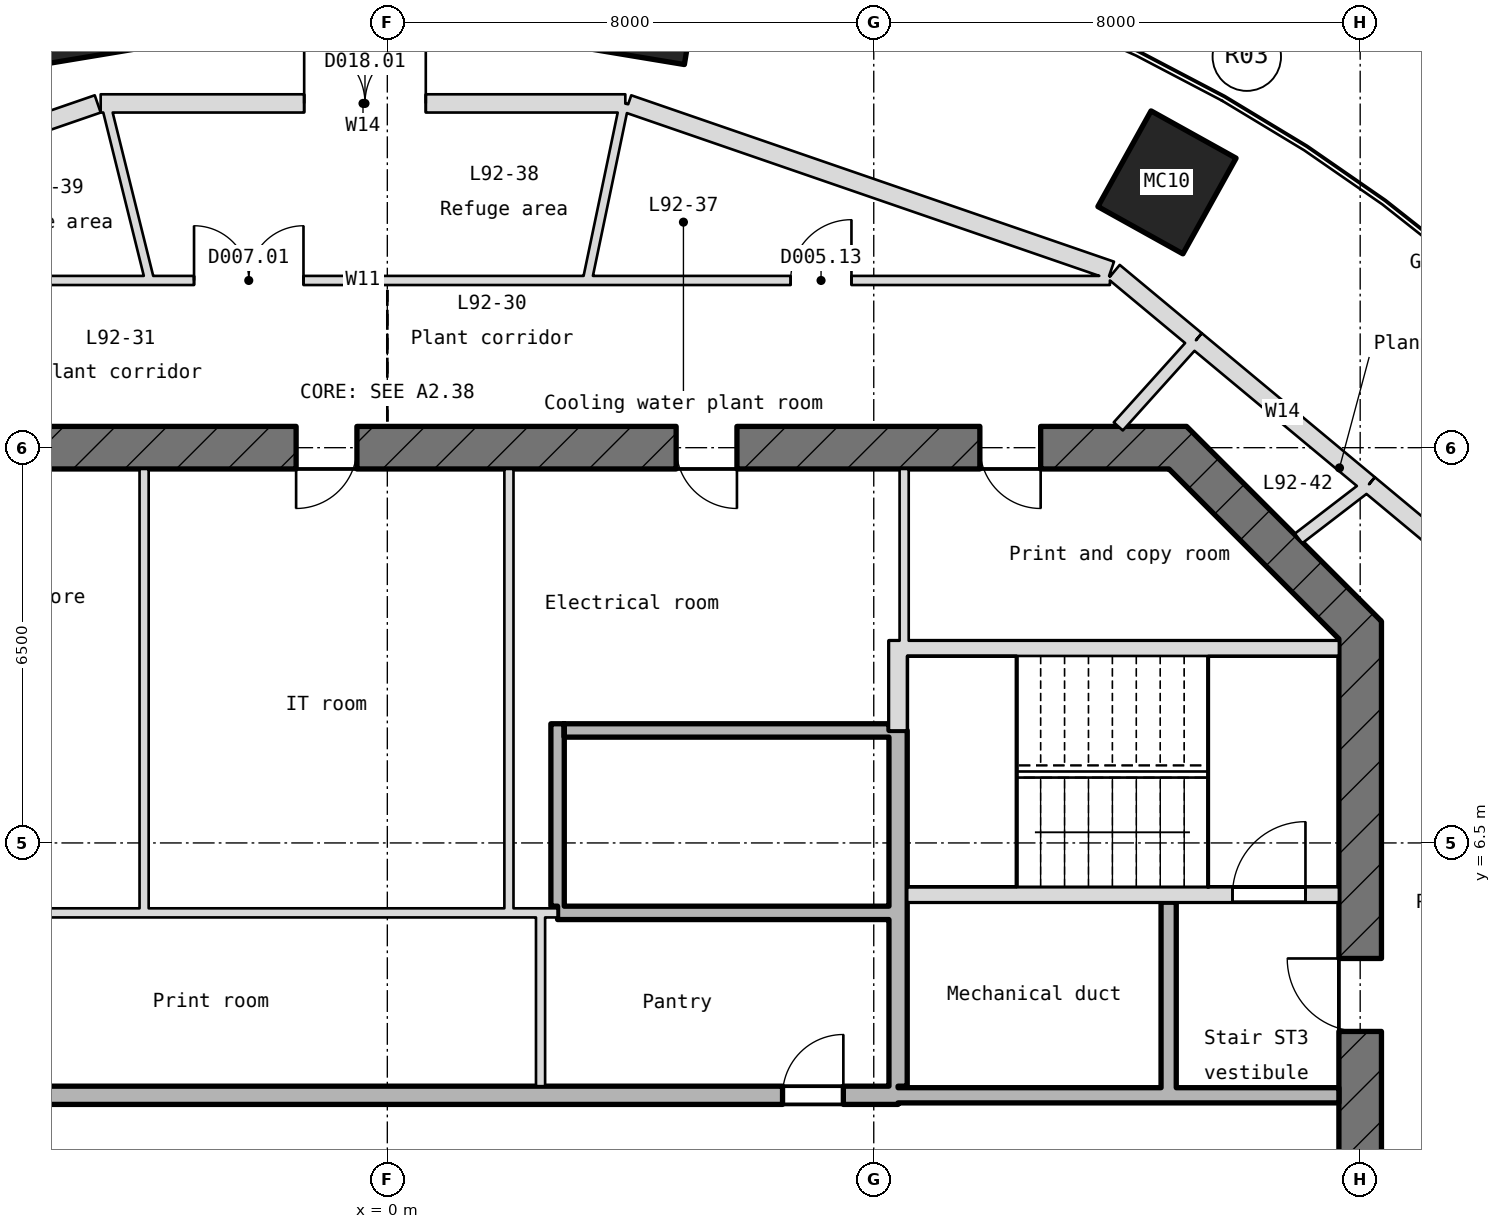
"""IFC4 building model, lengths in metres.
Left out: names, types, materials, properties, quantities, classifications, styles, units other than length and angle.
Written with IfcOpenShell. Run it as: python <this file> out.ifc"""

import sys

from ifc_helpers import new_model, si_unit, direction, frame, frame_2d, origin, place, context, subcontext, project, spatial, polyline, rectangle, outline, extrude, element, fill, save


model = new_model("IFC4")
c1 = context("Model", 3, precision=1e-05, world=origin(), true_north=direction((0.0, 1.0)))
c2 = subcontext(c1, "Body", "Model", "MODEL_VIEW")
j1 = project(units=[si_unit("LENGTHUNIT", "METRE"), si_unit("PLANEANGLEUNIT", "RADIAN")], contexts=[c1])
p1 = place(None, origin())
s1 = spatial("IfcSite", under=j1, at=p1, CompositionType="ELEMENT")
p2 = place(p1, origin())
s2 = spatial("IfcBuilding", under=s1, at=p2, CompositionType="ELEMENT")
p3 = place(p2, frame((0.0, 0.0, 407.55)))
s3 = spatial("IfcBuildingStorey", under=s2, at=p3, CompositionType="ELEMENT", Elevation=407.55)
p4 = place(p3, frame((0.0, 0.0, -0.3)))
e1 = element("IfcColumn", 1, at=p4, inside=s3, PredefinedType="COLUMN", context=c2, shape_type="SweptSolid", body=[
    extrude(outline(polyline([(12.839, 15.884), (11.44, 16.662), (12.315, 18.235), (12.561, 18.538), (13.959, 17.761), (13.085, 16.188), (12.839, 15.884)])), origin(), (0.0, 0.0, 1.0), 6.1),
])
p5 = place(p3, frame((0.0, 0.0, -0.3)))
e2 = element("IfcColumn", 2, at=p5, inside=s3, PredefinedType="COLUMN", context=c2, shape_type="SweptSolid", body=[
    extrude(outline(polyline([(4.799, 18.943), (3.221, 19.204), (3.515, 20.98), (3.601, 21.338), (5.179, 21.077), (4.885, 19.301), (4.799, 18.943)])), origin(), (0.0, 0.0, 1.0), 6.1),
])
p6 = place(p3, frame((0.0, 0.0, -0.3)))
e3 = element("IfcColumn", 3, at=p6, inside=s3, PredefinedType="COLUMN", context=c2, shape_type="SweptSolid", body=[
    extrude(outline(polyline([(-5.599, 18.943), (-5.685, 19.301), (-5.979, 21.077), (-4.401, 21.338), (-4.315, 20.98), (-4.021, 19.204), (-5.599, 18.943)])), origin(), (0.0, 0.0, 1.0), 6.1),
])
p7 = place(p3, frame((16.0, -10.145, -0.3), z_axis=(0.0, 0.0, 1.0), x_axis=(0.0, 1.0, 0.0)))
e4 = element("IfcWall", 4, at=p7, inside=s3, PredefinedType="SHEAR", context=c2, shape_type="SweptSolid", body=[
    extrude(rectangle(XDim=20.29, YDim=0.7, at=frame_2d((10.145, 0.0))), origin(), (0.0, 0.0, 1.0), 6.1),
])
p8 = place(p7, frame((8.945, 0.0, 0.3)))
e5 = element("IfcOpeningElement", 5, at=p8, cuts=e4, PredefinedType="OPENING", context=c2, shape_type="SweptSolid", body=[
    extrude(rectangle(XDim=2.4, YDim=2.1, at=frame_2d((1.2, 1.05))), frame((0.0, 0.36, 0.0), z_axis=(0.0, -1.0, 0.0), x_axis=(1.0, 0.0, 0.0)), (0.0, 0.0, 1.0), 0.72),
])
p9 = place(p7, frame((13.545, 0.0, 0.3)))
e6 = element("IfcOpeningElement", 6, at=p9, cuts=e4, PredefinedType="OPENING", context=c2, shape_type="SweptSolid", body=[
    extrude(rectangle(XDim=1.2, YDim=2.1, at=frame_2d((0.6, 1.05))), frame((0.0, 0.36, 0.0), z_axis=(0.0, -1.0, 0.0), x_axis=(1.0, 0.0, 0.0)), (0.0, 0.0, 1.0), 0.72),
])
p10 = place(p7, frame((4.745, 0.0, 0.3)))
e7 = element("IfcOpeningElement", 7, at=p10, cuts=e4, PredefinedType="OPENING", context=c2, shape_type="SweptSolid", body=[
    extrude(rectangle(XDim=1.2, YDim=2.1, at=frame_2d((0.6, 1.05))), frame((0.0, 0.36, 0.0), z_axis=(0.0, -1.0, 0.0), x_axis=(1.0, 0.0, 0.0)), (0.0, 0.0, 1.0), 0.72),
])
p11 = place(p3, frame((16.103, 9.897, -0.3), z_axis=(0.0, 0.0, 1.0), x_axis=(-0.707106781187, 0.707106781187, 0.0)))
e8 = element("IfcWall", 8, at=p11, inside=s3, PredefinedType="SHEAR", context=c2, shape_type="SweptSolid", body=[
    extrude(rectangle(XDim=4.533, YDim=0.7, at=frame_2d((2.266, 0.0))), origin(), (0.0, 0.0, 1.0), 6.1),
])
p12 = place(p3, frame((13.145, 13.0, -0.3), z_axis=(0.0, 0.0, 1.0), x_axis=(-1.0, 0.0, 0.0)))
e9 = element("IfcWall", 9, at=p12, inside=s3, PredefinedType="SHEAR", context=c2, shape_type="SweptSolid", body=[
    extrude(rectangle(XDim=26.29, YDim=0.7, at=frame_2d((13.145, 0.0))), origin(), (0.0, 0.0, 1.0), 6.1),
])
p13 = place(p12, frame((21.073, 0.0, 0.3)))
e10 = element("IfcOpeningElement", 10, at=p13, cuts=e9, PredefinedType="OPENING", context=c2, shape_type="SweptSolid", body=[
    extrude(rectangle(XDim=1.0, YDim=2.1, at=frame_2d((0.5, 1.05))), frame((0.0, 0.36, 0.0), z_axis=(0.0, -1.0, 0.0), x_axis=(1.0, 0.0, 0.0)), (0.0, 0.0, 1.0), 0.72),
])
p14 = place(p12, frame((13.645, 0.0, 0.3)))
e11 = element("IfcOpeningElement", 11, at=p14, cuts=e9, PredefinedType="OPENING", context=c2, shape_type="SweptSolid", body=[
    extrude(rectangle(XDim=1.0, YDim=2.1, at=frame_2d((0.5, 1.05))), frame((0.0, 0.36, 0.0), z_axis=(0.0, -1.0, 0.0), x_axis=(1.0, 0.0, 0.0)), (0.0, 0.0, 1.0), 0.72),
])
p15 = place(p12, frame((7.395, 0.0, 0.3)))
e12 = element("IfcOpeningElement", 12, at=p15, cuts=e9, PredefinedType="OPENING", context=c2, shape_type="SweptSolid", body=[
    extrude(rectangle(XDim=1.0, YDim=2.1, at=frame_2d((0.5, 1.05))), frame((0.0, 0.36, 0.0), z_axis=(0.0, -1.0, 0.0), x_axis=(1.0, 0.0, 0.0)), (0.0, 0.0, 1.0), 0.72),
])
p16 = place(p12, frame((2.4, 0.0, 0.3)))
e13 = element("IfcOpeningElement", 13, at=p16, cuts=e9, PredefinedType="OPENING", context=c2, shape_type="SweptSolid", body=[
    extrude(rectangle(XDim=1.0, YDim=2.1, at=frame_2d((0.5, 1.05))), frame((0.0, 0.36, 0.0), z_axis=(0.0, -1.0, 0.0), x_axis=(1.0, 0.0, 0.0)), (0.0, 0.0, 1.0), 0.72),
])
p17 = place(p3, frame((-8.4, 2.35, -0.3), z_axis=(0.0, 0.0, 1.0), x_axis=(1.0, 0.0, 0.0)))
e14 = element("IfcWall", 14, at=p17, inside=s3, PredefinedType="SHEAR", context=c2, shape_type="SweptSolid", body=[
    extrude(rectangle(XDim=16.8, YDim=0.3, at=frame_2d((8.4, 0.0))), origin(), (0.0, 0.0, 1.0), 6.1),
])
p18 = place(p17, frame((0.9, 0.0, 0.3)))
e15 = element("IfcOpeningElement", 15, at=p18, cuts=e14, PredefinedType="OPENING", context=c2, shape_type="SweptSolid", body=[
    extrude(rectangle(XDim=1.0, YDim=2.1, at=frame_2d((0.5, 1.05))), frame((0.0, 0.16, 0.0), z_axis=(0.0, -1.0, 0.0), x_axis=(1.0, 0.0, 0.0)), (0.0, 0.0, 1.0), 0.32),
])
p19 = place(p17, frame((14.9, 0.0, 0.3)))
e16 = element("IfcOpeningElement", 16, at=p19, cuts=e14, PredefinedType="OPENING", context=c2, shape_type="SweptSolid", body=[
    extrude(rectangle(XDim=1.0, YDim=2.1, at=frame_2d((0.5, 1.05))), frame((0.0, 0.16, 0.0), z_axis=(0.0, -1.0, 0.0), x_axis=(1.0, 0.0, 0.0)), (0.0, 0.0, 1.0), 0.32),
])
p20 = place(p3, frame((8.4, 2.35, 0.0), z_axis=(0.0, 0.0, 1.0), x_axis=(1.0, 0.0, 0.0)))
e17 = element("IfcWall", 17, at=p20, inside=s3, PredefinedType="STANDARD", context=c2, shape_type="SweptSolid", body=[
    extrude(rectangle(XDim=7.25, YDim=0.25, at=frame_2d((3.625, 0.0))), origin(), (0.0, 0.0, 1.0), 5.8),
])
p21 = place(p3, frame((-8.25, 5.35, 0.0), z_axis=(0.0, 0.0, 1.0), x_axis=(1.0, 0.0, 0.0)))
e18 = element("IfcWall", 18, at=p21, inside=s3, PredefinedType="PARTITIONING", context=c2, shape_type="SweptSolid", body=[
    extrude(rectangle(XDim=11.05, YDim=0.15, at=frame_2d((5.525, 0.0))), origin(), (0.0, 0.0, 1.0), 5.8),
])
p22 = place(p3, frame((2.8, 5.35, 0.0), z_axis=(0.0, 0.0, 1.0), x_axis=(1.0, 0.0, 0.0)))
e19 = element("IfcWall", 19, at=p22, inside=s3, PredefinedType="STANDARD", context=c2, shape_type="SweptSolid", body=[
    extrude(rectangle(XDim=5.45, YDim=0.22, at=frame_2d((2.725, 0.0))), origin(), (0.0, 0.0, 1.0), 5.8),
])
p23 = place(p3, frame((8.55, 5.65, -0.3), z_axis=(0.0, 0.0, 1.0), x_axis=(1.0, 0.0, 0.0)))
e20 = element("IfcWall", 20, at=p23, inside=s3, PredefinedType="SHEAR", context=c2, shape_type="SweptSolid", body=[
    extrude(rectangle(XDim=7.1, YDim=0.25, at=frame_2d((3.55, 0.0))), origin(), (0.0, 0.0, 1.0), 6.1),
])
p24 = place(p23, frame((5.35, 0.0, 0.3)))
e21 = element("IfcOpeningElement", 21, at=p24, cuts=e20, PredefinedType="OPENING", context=c2, shape_type="SweptSolid", body=[
    extrude(rectangle(XDim=1.2, YDim=2.1, at=frame_2d((0.6, 1.05))), frame((0.0, 0.135, 0.0), z_axis=(0.0, -1.0, 0.0), x_axis=(1.0, 0.0, 0.0)), (0.0, 0.0, 1.0), 0.27),
])
p25 = place(p3, frame((2.91, 8.35, 0.0), z_axis=(0.0, 0.0, 1.0), x_axis=(1.0, 0.0, 0.0)))
e22 = element("IfcWall", 22, at=p25, inside=s3, PredefinedType="STANDARD", context=c2, shape_type="SweptSolid", body=[
    extrude(rectangle(XDim=5.34, YDim=0.22, at=frame_2d((2.67, 0.0))), origin(), (0.0, 0.0, 1.0), 5.8),
])
p26 = place(p3, frame((8.55, 9.7, -0.3), z_axis=(0.0, 0.0, 1.0), x_axis=(1.0, 0.0, 0.0)))
e23 = element("IfcWall", 23, at=p26, inside=s3, PredefinedType="SHEAR", context=c2, shape_type="SweptSolid", body=[
    extrude(rectangle(XDim=7.1, YDim=0.25, at=frame_2d((3.55, 0.0))), origin(), (0.0, 0.0, 1.0), 6.1),
])
for number, where, z_axis, x_axis in (
    (24, (-4.0, 5.425, 0.0), (0.0, 0.0, 1.0), (0.0, 1.0, 0.0)),
    (25, (2.0, 5.425, 0.0), (0.0, 0.0, 1.0), (0.0, 1.0, 0.0)),
):
    element("IfcWall", number, at=place(p3, frame(where, z_axis=z_axis, x_axis=x_axis)), inside=s3, PredefinedType="PARTITIONING", context=c2, shape_type="SweptSolid", body=[
        extrude(rectangle(XDim=7.225, YDim=0.15, at=frame_2d((3.612, 0.0))), origin(), (0.0, 0.0, 1.0), 5.8),
    ])
p27 = place(p3, frame((2.52, 2.5, 0.0), z_axis=(0.0, 0.0, 1.0), x_axis=(0.0, 1.0, 0.0)))
e26 = element("IfcWall", 26, at=p27, inside=s3, PredefinedType="PARTITIONING", context=c2, shape_type="SweptSolid", body=[
    extrude(rectangle(XDim=2.775, YDim=0.15, at=frame_2d((1.387, 0.0))), origin(), (0.0, 0.0, 1.0), 5.8),
])
p28 = place(p3, frame((2.8, 5.46, 0.0), z_axis=(0.0, 0.0, 1.0), x_axis=(0.0, 1.0, 0.0)))
e27 = element("IfcWall", 27, at=p28, inside=s3, PredefinedType="STANDARD", context=c2, shape_type="SweptSolid", body=[
    extrude(rectangle(XDim=3.0, YDim=0.22, at=frame_2d((1.5, 0.0))), origin(), (0.0, 0.0, 1.0), 5.8),
])
p29 = place(p3, frame((8.4, 2.5, -0.3), z_axis=(0.0, 0.0, 1.0), x_axis=(0.0, 1.0, 0.0)))
e28 = element("IfcWall", 28, at=p29, inside=s3, PredefinedType="SHEAR", context=c2, shape_type="SweptSolid", body=[
    extrude(rectangle(XDim=5.85, YDim=0.3, at=frame_2d((2.925, 0.0))), origin(), (0.0, 0.0, 1.0), 6.1),
])
p30 = place(p3, frame((8.4, 8.35, -0.3), z_axis=(0.0, 0.0, 1.0), x_axis=(0.0, 1.0, 0.0)))
e29 = element("IfcWall", 29, at=p30, inside=s3, PredefinedType="SHEAR", context=c2, shape_type="SweptSolid", body=[
    extrude(rectangle(XDim=1.475, YDim=0.3, at=frame_2d((0.737, 0.0))), origin(), (0.0, 0.0, 1.0), 6.1),
])
p31 = place(p3, frame((8.5, 9.825, 0.0), z_axis=(0.0, 0.0, 1.0), x_axis=(0.0, 1.0, 0.0)))
e30 = element("IfcWall", 30, at=p31, inside=s3, PredefinedType="PARTITIONING", context=c2, shape_type="SweptSolid", body=[
    extrude(rectangle(XDim=2.825, YDim=0.15, at=frame_2d((1.413, 0.0))), origin(), (0.0, 0.0, 1.0), 5.8),
])
p32 = place(p3, frame((12.85, 2.475, 0.0), z_axis=(0.0, 0.0, 1.0), x_axis=(0.0, 1.0, 0.0)))
e31 = element("IfcWall", 31, at=p32, inside=s3, PredefinedType="STANDARD", context=c2, shape_type="SweptSolid", body=[
    extrude(rectangle(XDim=3.05, YDim=0.25, at=frame_2d((1.525, 0.0))), origin(), (0.0, 0.0, 1.0), 5.8),
])
p33 = place(p3, frame((16.145, 12.4, 0.0), z_axis=(0.0, 0.0, 1.0), x_axis=(-0.768729274682, 0.63957431331, 0.0)))
e32 = element("IfcWall", 32, at=p33, inside=s3, PredefinedType="STANDARD", context=c2, shape_type="SweptSolid", body=[
    extrude(rectangle(XDim=3.701, YDim=0.3, at=frame_2d((1.851, 0.0))), origin(), (0.0, 0.0, 1.0), 5.8),
])
p34 = place(p3, frame((-4.714, 18.662, 0.0), z_axis=(0.0, 0.0, 1.0), x_axis=(1.0, 0.0, 0.0)))
e33 = element("IfcWall", 33, at=p34, inside=s3, PredefinedType="STANDARD", context=c2, shape_type="SweptSolid", body=[
    extrude(rectangle(XDim=8.628, YDim=0.3, at=frame_2d((4.314, 0.0))), origin(), (0.0, 0.0, 1.0), 5.8),
])
p35 = place(p34, frame((3.347, 0.0, 0.0)))
e34 = element("IfcOpeningElement", 34, at=p35, cuts=e33, PredefinedType="OPENING", context=c2, shape_type="SweptSolid", body=[
    extrude(rectangle(XDim=2.0, YDim=2.1, at=frame_2d((1.0, 1.05))), frame((0.0, 0.16, 0.0), z_axis=(0.0, -1.0, 0.0), x_axis=(1.0, 0.0, 0.0)), (0.0, 0.0, 1.0), 0.32),
])
p36 = place(p3, frame((-12.702, 15.917, 0.0), z_axis=(0.0, 0.0, 1.0), x_axis=(0.945424873084, 0.32584015921, 0.0)))
e35 = element("IfcWall", 35, at=p36, inside=s3, PredefinedType="STANDARD", context=c2, shape_type="SweptSolid", body=[
    extrude(rectangle(XDim=8.398, YDim=0.3, at=frame_2d((4.199, 0.0))), origin(), (0.0, 0.0, 1.0), 5.8),
])
p37 = place(p36, frame((3.601, 0.0, 0.0)))
e36 = element("IfcOpeningElement", 36, at=p37, cuts=e35, PredefinedType="OPENING", context=c2, shape_type="SweptSolid", body=[
    extrude(rectangle(XDim=2.0, YDim=2.1, at=frame_2d((1.0, 1.05))), frame((0.0, 0.16, 0.0), z_axis=(0.0, -1.0, 0.0), x_axis=(1.0, 0.0, 0.0)), (0.0, 0.0, 1.0), 0.32),
])
p38 = place(p3, frame((11.903, 15.917, 0.0), z_axis=(0.0, 0.0, 1.0), x_axis=(-0.945427959595, 0.325831203565, 0.0)))
e37 = element("IfcWall", 37, at=p38, inside=s3, PredefinedType="STANDARD", context=c2, shape_type="SweptSolid", body=[
    extrude(rectangle(XDim=8.398, YDim=0.3, at=frame_2d((4.199, 0.0))), origin(), (0.0, 0.0, 1.0), 5.8),
])
p39 = place(p3, frame((17.955, 10.893, 0.0), z_axis=(0.0, 0.0, 1.0), x_axis=(-0.768688803044, 0.639622954618, 0.0)))
e38 = element("IfcWall", 38, at=p39, inside=s3, PredefinedType="STANDARD", context=c2, shape_type="SweptSolid", body=[
    extrude(rectangle(XDim=2.353, YDim=0.3, at=frame_2d((1.177, 0.0))), origin(), (0.0, 0.0, 1.0), 5.8),
])
p40 = place(p3, frame((13.298, 14.768, 0.0), z_axis=(0.0, 0.0, 1.0), x_axis=(-0.768722934059, 0.639581934275, 0.0)))
e39 = element("IfcWall", 39, at=p40, inside=s3, PredefinedType="STANDARD", context=c2, shape_type="SweptSolid", body=[
    extrude(rectangle(XDim=1.754, YDim=0.3, at=frame_2d((0.877, 0.0))), origin(), (0.0, 0.0, 1.0), 5.8),
])
p41 = place(p3, frame((-12.684, 15.75, 0.0), z_axis=(0.0, 0.0, 1.0), x_axis=(1.0, 0.0, 0.0)))
e40 = element("IfcWall", 40, at=p41, inside=s3, PredefinedType="PARTITIONING", context=c2, shape_type="SweptSolid", body=[
    extrude(rectangle(XDim=24.568, YDim=0.15, at=frame_2d((12.284, 0.0))), origin(), (0.0, 0.0, 1.0), 5.8),
])
p42 = place(p41, frame((19.317, 0.0, 0.0)))
e41 = element("IfcOpeningElement", 41, at=p42, cuts=e40, PredefinedType="OPENING", context=c2, shape_type="SweptSolid", body=[
    extrude(rectangle(XDim=1.0, YDim=2.1, at=frame_2d((0.5, 1.05))), frame((0.0, 0.085, 0.0), z_axis=(0.0, -1.0, 0.0), x_axis=(1.0, 0.0, 0.0)), (0.0, 0.0, 1.0), 0.17),
])
p43 = place(p41, frame((9.505, 0.0, 0.0)))
e42 = element("IfcOpeningElement", 42, at=p43, cuts=e40, PredefinedType="OPENING", context=c2, shape_type="SweptSolid", body=[
    extrude(rectangle(XDim=1.8, YDim=2.1, at=frame_2d((0.9, 1.05))), frame((0.0, 0.085, 0.0), z_axis=(0.0, -1.0, 0.0), x_axis=(1.0, 0.0, 0.0)), (0.0, 0.0, 1.0), 0.17),
])
p44 = place(p41, frame((3.524, 0.0, 0.0)))
e43 = element("IfcOpeningElement", 43, at=p44, cuts=e40, PredefinedType="OPENING", context=c2, shape_type="SweptSolid", body=[
    extrude(rectangle(XDim=1.8, YDim=2.1, at=frame_2d((0.9, 1.05))), frame((0.0, 0.085, 0.0), z_axis=(0.0, -1.0, 0.0), x_axis=(1.0, 0.0, 0.0)), (0.0, 0.0, 1.0), 0.17),
])
p45 = place(p3, frame((3.289, 15.75, 0.0), z_axis=(0.0, 0.0, 1.0), x_axis=(0.204458992869, 0.978875130052, 0.0)))
e44 = element("IfcWall", 44, at=p45, inside=s3, PredefinedType="PARTITIONING", context=c2, shape_type="SweptSolid", body=[
    extrude(rectangle(XDim=2.974, YDim=0.15, at=frame_2d((1.487, 0.0))), origin(), (0.0, 0.0, 1.0), 5.447),
])
p46 = place(p3, frame((-3.909, 15.75, 0.0), z_axis=(0.0, 0.0, 1.0), x_axis=(-0.240888502077, 0.970552795868, 0.0)))
e45 = element("IfcWall", 45, at=p46, inside=s3, PredefinedType="PARTITIONING", context=c2, shape_type="SweptSolid", body=[
    extrude(rectangle(XDim=3.0, YDim=0.15, at=frame_2d((1.5, 0.0))), origin(), (0.0, 0.0, 1.0), 5.447),
])
p47 = place(p3, frame((14.987, 11.508, 0.0), z_axis=(0.0, 0.0, 1.0), x_axis=(0.793114198042, 0.609072958572, 0.0)))
e46 = element("IfcWall", 46, at=p47, inside=s3, PredefinedType="PARTITIONING", context=c2, shape_type="SweptSolid", body=[
    extrude(rectangle(XDim=1.462, YDim=0.2, at=frame_2d((0.731, 0.0))), origin(), (0.0, 0.0, 1.0), 5.8),
])
p48 = place(p3, frame((12.021, 13.35, 0.0), z_axis=(0.0, 0.0, 1.0), x_axis=(0.669099016905, 0.743173267534, 0.0)))
e47 = element("IfcWall", 47, at=p48, inside=s3, PredefinedType="PARTITIONING", context=c2, shape_type="SweptSolid", body=[
    extrude(rectangle(XDim=1.908, YDim=0.2, at=frame_2d((0.954, 0.0))), origin(), (0.0, 0.0, 1.0), 5.8),
])
p49 = place(p24, origin())
e48 = element("IfcDoor", 48, at=p49, inside=s3, OperationType="SINGLE_SWING_RIGHT", PredefinedType="DOOR", context=c2, shape_type="SweptSolid", body=[
    extrude(rectangle(XDim=1.2, YDim=2.1, at=frame_2d((0.6, 1.05))), frame((0.0, 0.025, 0.0), z_axis=(0.0, -1.0, 0.0), x_axis=(1.0, 0.0, 0.0)), (0.0, 0.0, 1.0), 0.05),
])
fill(e21, e48)
p50 = place(p9, origin())
e49 = element("IfcDoor", 49, at=p50, inside=s3, OperationType="SINGLE_SWING_RIGHT", PredefinedType="DOOR", context=c2, shape_type="SweptSolid", body=[
    extrude(rectangle(XDim=1.2, YDim=2.1, at=frame_2d((0.6, 1.05))), frame((0.0, 0.025, 0.0), z_axis=(0.0, -1.0, 0.0), x_axis=(1.0, 0.0, 0.0)), (0.0, 0.0, 1.0), 0.05),
])
fill(e6, e49)
p51 = place(p19, origin())
e50 = element("IfcDoor", 50, at=p51, inside=s3, OperationType="SINGLE_SWING_RIGHT", PredefinedType="DOOR", context=c2, shape_type="SweptSolid", body=[
    extrude(rectangle(XDim=1.0, YDim=2.1, at=frame_2d((0.5, 1.05))), frame((0.0, 0.025, 0.0), z_axis=(0.0, -1.0, 0.0), x_axis=(1.0, 0.0, 0.0)), (0.0, 0.0, 1.0), 0.05),
])
fill(e16, e50)
p52 = place(p14, origin())
e51 = element("IfcDoor", 51, at=p52, inside=s3, OperationType="SINGLE_SWING_RIGHT", PredefinedType="DOOR", context=c2, shape_type="SweptSolid", body=[
    extrude(rectangle(XDim=1.0, YDim=2.1, at=frame_2d((0.5, 1.05))), frame((0.0, 0.025, 0.0), z_axis=(0.0, -1.0, 0.0), x_axis=(1.0, 0.0, 0.0)), (0.0, 0.0, 1.0), 0.05),
])
fill(e11, e51)
p53 = place(p15, origin())
e52 = element("IfcDoor", 52, at=p53, inside=s3, OperationType="SINGLE_SWING_RIGHT", PredefinedType="DOOR", context=c2, shape_type="SweptSolid", body=[
    extrude(rectangle(XDim=1.0, YDim=2.1, at=frame_2d((0.5, 1.05))), frame((0.0, 0.025, 0.0), z_axis=(0.0, -1.0, 0.0), x_axis=(1.0, 0.0, 0.0)), (0.0, 0.0, 1.0), 0.05),
])
fill(e12, e52)
p54 = place(p16, origin())
e53 = element("IfcDoor", 53, at=p54, inside=s3, OperationType="SINGLE_SWING_RIGHT", PredefinedType="DOOR", context=c2, shape_type="SweptSolid", body=[
    extrude(rectangle(XDim=1.0, YDim=2.1, at=frame_2d((0.5, 1.05))), frame((0.0, 0.025, 0.0), z_axis=(0.0, -1.0, 0.0), x_axis=(1.0, 0.0, 0.0)), (0.0, 0.0, 1.0), 0.05),
])
fill(e13, e53)
p55 = place(p42, origin())
e54 = element("IfcDoor", 54, at=p55, inside=s3, OperationType="SINGLE_SWING_RIGHT", PredefinedType="DOOR", context=c2, shape_type="SweptSolid", body=[
    extrude(rectangle(XDim=1.0, YDim=2.1, at=frame_2d((0.5, 1.05))), frame((0.0, 0.025, 0.0), z_axis=(0.0, -1.0, 0.0), x_axis=(1.0, 0.0, 0.0)), (0.0, 0.0, 1.0), 0.05),
])
fill(e41, e54)
p56 = place(p43, origin())
e55 = element("IfcDoor", 55, at=p56, inside=s3, OperationType="DOUBLE_DOOR_SINGLE_SWING", PredefinedType="DOOR", context=c2, shape_type="SweptSolid", body=[
    extrude(rectangle(XDim=1.8, YDim=2.1, at=frame_2d((0.9, 1.05))), frame((0.0, 0.025, 0.0), z_axis=(0.0, -1.0, 0.0), x_axis=(1.0, 0.0, 0.0)), (0.0, 0.0, 1.0), 0.05),
])
fill(e42, e55)
p57 = place(p35, origin())
e56 = element("IfcDoor", 56, at=p57, inside=s3, OperationType="DOUBLE_DOOR_SINGLE_SWING", PredefinedType="DOOR", context=c2, shape_type="SweptSolid", body=[
    extrude(rectangle(XDim=2.0, YDim=2.1, at=frame_2d((1.0, 1.05))), frame((0.0, 0.025, 0.0), z_axis=(0.0, -1.0, 0.0), x_axis=(1.0, 0.0, 0.0)), (0.0, 0.0, 1.0), 0.05),
])
fill(e34, e56)
save(model, sys.argv[1])
